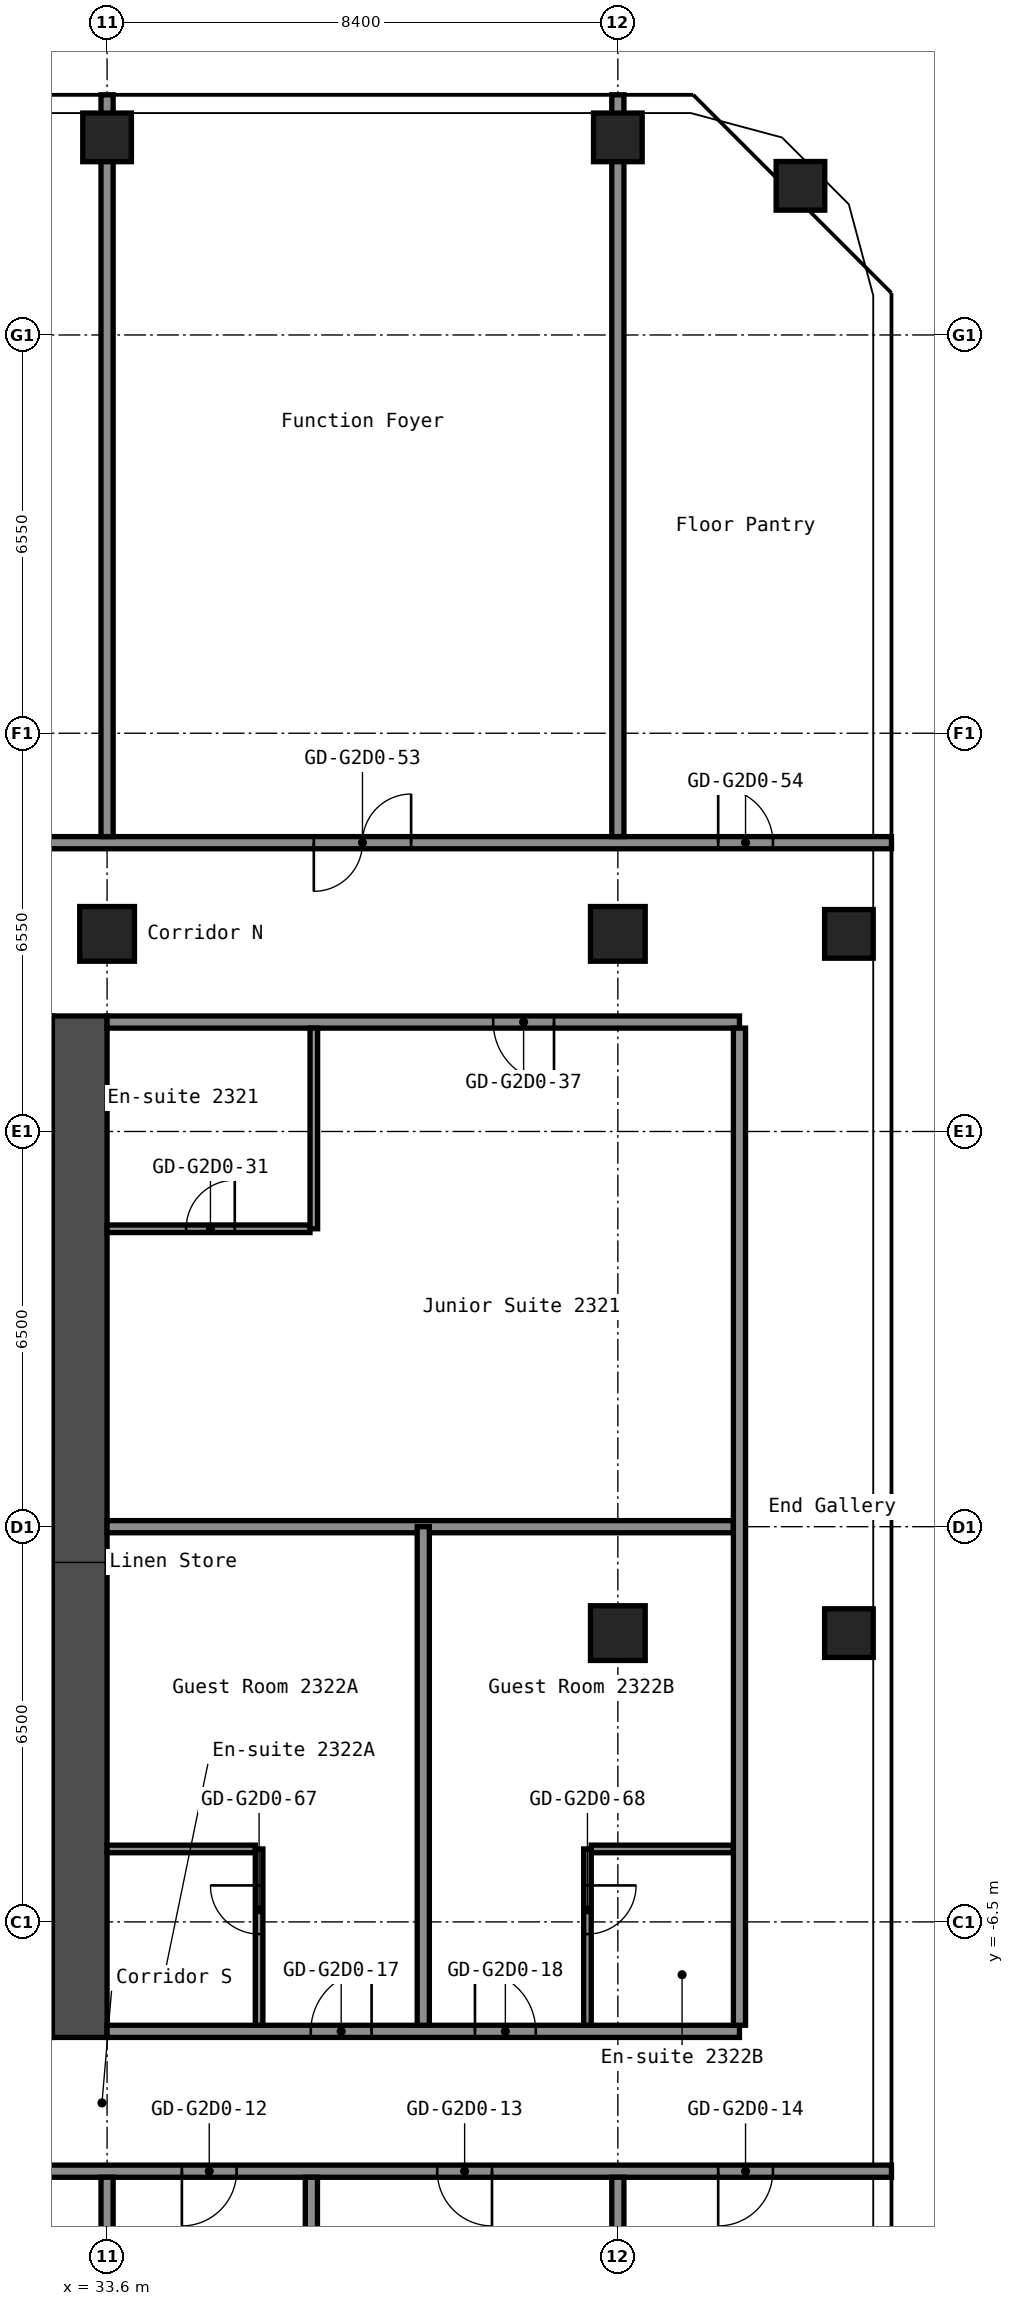
"""IFC4 building model, lengths in metres.
Left out: names, types, materials, properties, quantities, classifications, styles, units other than length and angle.
Written with IfcOpenShell. Run it as: python <this file> out.ifc"""

import sys

from ifc_helpers import new_model, si_unit, direction, frame, frame_2d, origin, origin_2d, place, context, subcontext, project, spatial, rectangle, hollow_rectangle, extrude, element, fill, save


model = new_model("IFC4")
c1 = context("Model", 3, precision=1e-05, world=origin(), true_north=direction((0.0, 1.0)))
c2 = subcontext(c1, "Body", "Model", "MODEL_VIEW")
j1 = project(units=[si_unit("LENGTHUNIT", "METRE"), si_unit("PLANEANGLEUNIT", "RADIAN")], contexts=[c1])
p1 = place(None, origin())
s1 = spatial("IfcSite", under=j1, at=p1, CompositionType="ELEMENT")
p2 = place(p1, origin())
s2 = spatial("IfcBuilding", under=s1, at=p2, CompositionType="ELEMENT")
p3 = place(p2, frame((0.0, 0.0, 85.0)))
s3 = spatial("IfcBuildingStorey", under=s2, at=p3, CompositionType="ELEMENT", Elevation=85.0)
p4 = place(p3, frame((33.6, 9.75, 0.0), z_axis=(0.0, 0.0, 1.0), x_axis=(1.0, 0.0, 0.0)))
e1 = element("IfcColumn", 1, at=p4, inside=s3, PredefinedType="COLUMN", context=c2, shape_type="SweptSolid", body=[
    extrude(hollow_rectangle(XDim=0.9, YDim=0.9, WallThickness=0.036, at=origin_2d()), origin(), (0.0, 0.0, 1.0), 2.8),
])
p5 = place(p3, frame((33.6, 22.85, 0.0), z_axis=(0.0, 0.0, 1.0), x_axis=(1.0, 0.0, 0.0)))
e2 = element("IfcColumn", 2, at=p5, inside=s3, PredefinedType="COLUMN", context=c2, shape_type="SweptSolid", body=[
    extrude(hollow_rectangle(XDim=0.8, YDim=0.8, WallThickness=0.032, at=origin_2d()), origin(), (0.0, 0.0, 1.0), 2.8),
])
for number, where, z_axis, x_axis in (
    (3, (42.0, -1.75, 0.0), (0.0, 0.0, 1.0), (1.0, 0.0, 0.0)),
    (4, (42.0, 9.75, 0.0), (0.0, 0.0, 1.0), (1.0, 0.0, 0.0)),
):
    element("IfcColumn", number, at=place(p3, frame(where, z_axis=z_axis, x_axis=x_axis)), inside=s3, PredefinedType="COLUMN", context=c2, shape_type="SweptSolid", body=[
        extrude(hollow_rectangle(XDim=0.9, YDim=0.9, WallThickness=0.036, at=origin_2d()), origin(), (0.0, 0.0, 1.0), 2.8),
    ])
for number, where, z_axis, x_axis in (
    (5, (42.0, 22.85, 0.0), (0.0, 0.0, 1.0), (1.0, 0.0, 0.0)),
    (6, (45.8, -1.75, 0.0), (0.0, 0.0, 1.0), (1.0, 0.0, 0.0)),
    (7, (45.8, 9.75, 0.0), (0.0, 0.0, 1.0), (1.0, 0.0, 0.0)),
    (8, (45.003, 22.053, 0.0), (0.0, 0.0, 1.0), (1.0, 0.0, 0.0)),
):
    element("IfcColumn", number, at=place(p3, frame(where, z_axis=z_axis, x_axis=x_axis)), inside=s3, PredefinedType="COLUMN", context=c2, shape_type="SweptSolid", body=[
        extrude(hollow_rectangle(XDim=0.8, YDim=0.8, WallThickness=0.032, at=origin_2d()), origin(), (0.0, 0.0, 1.0), 2.8),
    ])
p6 = place(p3, frame((33.15, -8.4, 0.0), z_axis=(0.0, 0.0, 1.0), x_axis=(0.0, 1.0, 0.0)))
e9 = element("IfcWall", 9, at=p6, inside=s3, PredefinedType="SHEAR", context=c2, shape_type="SweptSolid", body=[
    extrude(rectangle(XDim=16.8, YDim=0.9, at=frame_2d((8.4, 0.0))), origin(), (0.0, 0.0, 1.0), 2.8),
])
p7 = place(p3, frame((16.8, -10.6, 0.0), z_axis=(0.0, 0.0, 1.0), x_axis=(1.0, 0.0, 0.0)))
e10 = element("IfcWall", 10, at=p7, inside=s3, PredefinedType="PARTITIONING", context=c2, shape_type="SweptSolid", body=[
    extrude(rectangle(XDim=29.7, YDim=0.2, at=frame_2d((14.85, 0.0))), origin(), (0.0, 0.0, 1.0), 2.8),
])
p8 = place(p7, frame((1.82, 0.0, 0.0)))
e11 = element("IfcOpeningElement", 11, at=p8, cuts=e10, PredefinedType="OPENING", context=c2, shape_type="SweptSolid", body=[
    extrude(rectangle(XDim=0.9, YDim=2.1, at=frame_2d((0.45, 1.05))), frame((0.0, 0.11, 0.0), z_axis=(0.0, -1.0, 0.0), x_axis=(1.0, 0.0, 0.0)), (0.0, 0.0, 1.0), 0.22),
])
p9 = place(p7, frame((6.02, 0.0, 0.0)))
e12 = element("IfcOpeningElement", 12, at=p9, cuts=e10, PredefinedType="OPENING", context=c2, shape_type="SweptSolid", body=[
    extrude(rectangle(XDim=0.9, YDim=2.1, at=frame_2d((0.45, 1.05))), frame((0.0, 0.11, 0.0), z_axis=(0.0, -1.0, 0.0), x_axis=(1.0, 0.0, 0.0)), (0.0, 0.0, 1.0), 0.22),
])
p10 = place(p7, frame((10.3, 0.0, 0.0)))
e13 = element("IfcOpeningElement", 13, at=p10, cuts=e10, PredefinedType="OPENING", context=c2, shape_type="SweptSolid", body=[
    extrude(rectangle(XDim=0.9, YDim=2.1, at=frame_2d((0.45, 1.05))), frame((0.0, 0.11, 0.0), z_axis=(0.0, -1.0, 0.0), x_axis=(1.0, 0.0, 0.0)), (0.0, 0.0, 1.0), 0.22),
])
p11 = place(p7, frame((14.5, 0.0, 0.0)))
e14 = element("IfcOpeningElement", 14, at=p11, cuts=e10, PredefinedType="OPENING", context=c2, shape_type="SweptSolid", body=[
    extrude(rectangle(XDim=0.9, YDim=2.1, at=frame_2d((0.45, 1.05))), frame((0.0, 0.11, 0.0), z_axis=(0.0, -1.0, 0.0), x_axis=(1.0, 0.0, 0.0)), (0.0, 0.0, 1.0), 0.22),
])
p12 = place(p7, frame((18.03, 0.0, 0.0)))
e15 = element("IfcOpeningElement", 15, at=p12, cuts=e10, PredefinedType="OPENING", context=c2, shape_type="SweptSolid", body=[
    extrude(rectangle(XDim=0.9, YDim=2.1, at=frame_2d((0.45, 1.05))), frame((0.0, 0.11, 0.0), z_axis=(0.0, -1.0, 0.0), x_axis=(1.0, 0.0, 0.0)), (0.0, 0.0, 1.0), 0.22),
])
p13 = place(p7, frame((22.23, 0.0, 0.0)))
e16 = element("IfcOpeningElement", 16, at=p13, cuts=e10, PredefinedType="OPENING", context=c2, shape_type="SweptSolid", body=[
    extrude(rectangle(XDim=0.9, YDim=2.1, at=frame_2d((0.45, 1.05))), frame((0.0, 0.11, 0.0), z_axis=(0.0, -1.0, 0.0), x_axis=(1.0, 0.0, 0.0)), (0.0, 0.0, 1.0), 0.22),
])
p14 = place(p7, frame((26.85, 0.0, 0.0)))
e17 = element("IfcOpeningElement", 17, at=p14, cuts=e10, PredefinedType="OPENING", context=c2, shape_type="SweptSolid", body=[
    extrude(rectangle(XDim=0.9, YDim=2.1, at=frame_2d((0.45, 1.05))), frame((0.0, 0.11, 0.0), z_axis=(0.0, -1.0, 0.0), x_axis=(1.0, 0.0, 0.0)), (0.0, 0.0, 1.0), 0.22),
])
p15 = place(p3, frame((33.6, -8.3, 0.0), z_axis=(0.0, 0.0, 1.0), x_axis=(1.0, 0.0, 0.0)))
e18 = element("IfcWall", 18, at=p15, inside=s3, PredefinedType="PARTITIONING", context=c2, shape_type="SweptSolid", body=[
    extrude(rectangle(XDim=10.4, YDim=0.2, at=frame_2d((5.2, 0.0))), origin(), (0.0, 0.0, 1.0), 2.8),
])
p16 = place(p15, frame((3.35, 0.0, 0.0)))
e19 = element("IfcOpeningElement", 19, at=p16, cuts=e18, PredefinedType="OPENING", context=c2, shape_type="SweptSolid", body=[
    extrude(rectangle(XDim=1.0, YDim=2.1, at=frame_2d((0.5, 1.05))), frame((0.0, 0.11, 0.0), z_axis=(0.0, -1.0, 0.0), x_axis=(1.0, 0.0, 0.0)), (0.0, 0.0, 1.0), 0.22),
])
p17 = place(p15, frame((6.05, 0.0, 0.0)))
e20 = element("IfcOpeningElement", 20, at=p17, cuts=e18, PredefinedType="OPENING", context=c2, shape_type="SweptSolid", body=[
    extrude(rectangle(XDim=1.0, YDim=2.1, at=frame_2d((0.5, 1.05))), frame((0.0, 0.11, 0.0), z_axis=(0.0, -1.0, 0.0), x_axis=(1.0, 0.0, 0.0)), (0.0, 0.0, 1.0), 0.22),
])
p18 = place(p3, frame((33.6, -5.3, 0.0), z_axis=(0.0, 0.0, 1.0), x_axis=(1.0, 0.0, 0.0)))
e21 = element("IfcWall", 21, at=p18, inside=s3, PredefinedType="PARTITIONING", context=c2, shape_type="SweptSolid", body=[
    extrude(rectangle(XDim=2.438, YDim=0.125, at=frame_2d((1.219, 0.0))), origin(), (0.0, 0.0, 1.0), 2.8),
])
p19 = place(p3, frame((41.562, -5.3, 0.0), z_axis=(0.0, 0.0, 1.0), x_axis=(1.0, 0.0, 0.0)))
e22 = element("IfcWall", 22, at=p19, inside=s3, PredefinedType="PARTITIONING", context=c2, shape_type="SweptSolid", body=[
    extrude(rectangle(XDim=2.337, YDim=0.125, at=frame_2d((1.169, 0.0))), origin(), (0.0, 0.0, 1.0), 2.8),
])
p20 = place(p3, frame((33.6, 0.0, 0.0), z_axis=(0.0, 0.0, 1.0), x_axis=(1.0, 0.0, 0.0)))
e23 = element("IfcWall", 23, at=p20, inside=s3, PredefinedType="PARTITIONING", context=c2, shape_type="SweptSolid", body=[
    extrude(rectangle(XDim=10.3, YDim=0.2, at=frame_2d((5.15, 0.0))), origin(), (0.0, 0.0, 1.0), 2.8),
])
p21 = place(p3, frame((33.6, 4.9, 0.0), z_axis=(0.0, 0.0, 1.0), x_axis=(1.0, 0.0, 0.0)))
e24 = element("IfcWall", 24, at=p21, inside=s3, PredefinedType="PARTITIONING", context=c2, shape_type="SweptSolid", body=[
    extrude(rectangle(XDim=3.337, YDim=0.125, at=frame_2d((1.669, 0.0))), origin(), (0.0, 0.0, 1.0), 2.8),
])
p22 = place(p21, frame((1.3, 0.0, 0.0)))
e25 = element("IfcOpeningElement", 25, at=p22, cuts=e24, PredefinedType="OPENING", context=c2, shape_type="SweptSolid", body=[
    extrude(rectangle(XDim=0.8, YDim=2.1, at=frame_2d((0.4, 1.05))), frame((0.0, 0.073, 0.0), z_axis=(0.0, -1.0, 0.0), x_axis=(1.0, 0.0, 0.0)), (0.0, 0.0, 1.0), 0.145),
])
p23 = place(p3, frame((33.6, 8.3, 0.0), z_axis=(0.0, 0.0, 1.0), x_axis=(1.0, 0.0, 0.0)))
e26 = element("IfcWall", 26, at=p23, inside=s3, PredefinedType="PARTITIONING", context=c2, shape_type="SweptSolid", body=[
    extrude(rectangle(XDim=10.4, YDim=0.2, at=frame_2d((5.2, 0.0))), origin(), (0.0, 0.0, 1.0), 2.8),
])
p24 = place(p23, frame((6.35, 0.0, 0.0)))
e27 = element("IfcOpeningElement", 27, at=p24, cuts=e26, PredefinedType="OPENING", context=c2, shape_type="SweptSolid", body=[
    extrude(rectangle(XDim=1.0, YDim=2.1, at=frame_2d((0.5, 1.05))), frame((0.0, 0.11, 0.0), z_axis=(0.0, -1.0, 0.0), x_axis=(1.0, 0.0, 0.0)), (0.0, 0.0, 1.0), 0.22),
])
p25 = place(p3, frame((16.8, 11.25, 0.0), z_axis=(0.0, 0.0, 1.0), x_axis=(1.0, 0.0, 0.0)))
e28 = element("IfcWall", 28, at=p25, inside=s3, PredefinedType="PARTITIONING", context=c2, shape_type="SweptSolid", body=[
    extrude(rectangle(XDim=29.7, YDim=0.2, at=frame_2d((14.85, 0.0))), origin(), (0.0, 0.0, 1.0), 2.8),
])
p26 = place(p25, frame((3.4, 0.0, 0.0)))
e29 = element("IfcOpeningElement", 29, at=p26, cuts=e28, PredefinedType="OPENING", context=c2, shape_type="SweptSolid", body=[
    extrude(rectangle(XDim=1.6, YDim=2.1, at=frame_2d((0.8, 1.05))), frame((0.0, 0.11, 0.0), z_axis=(0.0, -1.0, 0.0), x_axis=(1.0, 0.0, 0.0)), (0.0, 0.0, 1.0), 0.22),
])
p27 = place(p25, frame((11.8, 0.0, 0.0)))
e30 = element("IfcOpeningElement", 30, at=p27, cuts=e28, PredefinedType="OPENING", context=c2, shape_type="SweptSolid", body=[
    extrude(rectangle(XDim=1.6, YDim=2.1, at=frame_2d((0.8, 1.05))), frame((0.0, 0.11, 0.0), z_axis=(0.0, -1.0, 0.0), x_axis=(1.0, 0.0, 0.0)), (0.0, 0.0, 1.0), 0.22),
])
p28 = place(p25, frame((20.2, 0.0, 0.0)))
e31 = element("IfcOpeningElement", 31, at=p28, cuts=e28, PredefinedType="OPENING", context=c2, shape_type="SweptSolid", body=[
    extrude(rectangle(XDim=1.6, YDim=2.1, at=frame_2d((0.8, 1.05))), frame((0.0, 0.11, 0.0), z_axis=(0.0, -1.0, 0.0), x_axis=(1.0, 0.0, 0.0)), (0.0, 0.0, 1.0), 0.22),
])
p29 = place(p25, frame((26.85, 0.0, 0.0)))
e32 = element("IfcOpeningElement", 32, at=p29, cuts=e28, PredefinedType="OPENING", context=c2, shape_type="SweptSolid", body=[
    extrude(rectangle(XDim=0.9, YDim=2.1, at=frame_2d((0.45, 1.05))), frame((0.0, 0.11, 0.0), z_axis=(0.0, -1.0, 0.0), x_axis=(1.0, 0.0, 0.0)), (0.0, 0.0, 1.0), 0.22),
])
p30 = place(p3, frame((33.6, -15.55, 0.0), z_axis=(0.0, 0.0, 1.0), x_axis=(0.0, 1.0, 0.0)))
e33 = element("IfcWall", 33, at=p30, inside=s3, PredefinedType="PARTITIONING", context=c2, shape_type="SweptSolid", body=[
    extrude(rectangle(XDim=4.85, YDim=0.2, at=frame_2d((2.425, 0.0))), origin(), (0.0, 0.0, 1.0), 2.8),
])
p31 = place(p3, frame((33.6, 11.35, 0.0), z_axis=(0.0, 0.0, 1.0), x_axis=(0.0, 1.0, 0.0)))
e34 = element("IfcWall", 34, at=p31, inside=s3, PredefinedType="PARTITIONING", context=c2, shape_type="SweptSolid", body=[
    extrude(rectangle(XDim=12.2, YDim=0.2, at=frame_2d((6.1, 0.0))), origin(), (0.0, 0.0, 1.0), 2.8),
])
p32 = place(p3, frame((36.1, -8.2, 0.0), z_axis=(0.0, 0.0, 1.0), x_axis=(0.0, 1.0, 0.0)))
e35 = element("IfcWall", 35, at=p32, inside=s3, PredefinedType="PARTITIONING", context=c2, shape_type="SweptSolid", body=[
    extrude(rectangle(XDim=2.9, YDim=0.125, at=frame_2d((1.45, 0.0))), origin(), (0.0, 0.0, 1.0), 2.8),
])
p33 = place(p32, frame((1.5, 0.0, 0.0)))
e36 = element("IfcOpeningElement", 36, at=p33, cuts=e35, PredefinedType="OPENING", context=c2, shape_type="SweptSolid", body=[
    extrude(rectangle(XDim=0.8, YDim=2.1, at=frame_2d((0.4, 1.05))), frame((0.0, 0.073, 0.0), z_axis=(0.0, -1.0, 0.0), x_axis=(1.0, 0.0, 0.0)), (0.0, 0.0, 1.0), 0.145),
])
p34 = place(p3, frame((36.96, -15.55, 0.0), z_axis=(0.0, 0.0, 1.0), x_axis=(0.0, 1.0, 0.0)))
e37 = element("IfcWall", 37, at=p34, inside=s3, PredefinedType="PARTITIONING", context=c2, shape_type="SweptSolid", body=[
    extrude(rectangle(XDim=4.85, YDim=0.2, at=frame_2d((2.425, 0.0))), origin(), (0.0, 0.0, 1.0), 2.8),
])
p35 = place(p3, frame((37.0, 4.9, 0.0), z_axis=(0.0, 0.0, 1.0), x_axis=(0.0, 1.0, 0.0)))
e38 = element("IfcWall", 38, at=p35, inside=s3, PredefinedType="PARTITIONING", context=c2, shape_type="SweptSolid", body=[
    extrude(rectangle(XDim=3.3, YDim=0.125, at=frame_2d((1.65, 0.0))), origin(), (0.0, 0.0, 1.0), 2.8),
])
p36 = place(p3, frame((38.8, -8.2, 0.0), z_axis=(0.0, 0.0, 1.0), x_axis=(0.0, 1.0, 0.0)))
e39 = element("IfcWall", 39, at=p36, inside=s3, PredefinedType="PARTITIONING", context=c2, shape_type="SweptSolid", body=[
    extrude(rectangle(XDim=8.2, YDim=0.2, at=frame_2d((4.1, 0.0))), origin(), (0.0, 0.0, 1.0), 2.8),
])
p37 = place(p3, frame((41.5, -8.2, 0.0), z_axis=(0.0, 0.0, 1.0), x_axis=(0.0, 1.0, 0.0)))
e40 = element("IfcWall", 40, at=p37, inside=s3, PredefinedType="PARTITIONING", context=c2, shape_type="SweptSolid", body=[
    extrude(rectangle(XDim=2.9, YDim=0.125, at=frame_2d((1.45, 0.0))), origin(), (0.0, 0.0, 1.0), 2.8),
])
p38 = place(p37, frame((1.5, 0.0, 0.0)))
e41 = element("IfcOpeningElement", 41, at=p38, cuts=e40, PredefinedType="OPENING", context=c2, shape_type="SweptSolid", body=[
    extrude(rectangle(XDim=0.8, YDim=2.1, at=frame_2d((0.4, 1.05))), frame((0.0, 0.073, 0.0), z_axis=(0.0, -1.0, 0.0), x_axis=(1.0, 0.0, 0.0)), (0.0, 0.0, 1.0), 0.145),
])
p39 = place(p3, frame((42.0, -15.55, 0.0), z_axis=(0.0, 0.0, 1.0), x_axis=(0.0, 1.0, 0.0)))
e42 = element("IfcWall", 42, at=p39, inside=s3, PredefinedType="PARTITIONING", context=c2, shape_type="SweptSolid", body=[
    extrude(rectangle(XDim=4.85, YDim=0.2, at=frame_2d((2.425, 0.0))), origin(), (0.0, 0.0, 1.0), 2.8),
])
p40 = place(p3, frame((42.0, 11.35, 0.0), z_axis=(0.0, 0.0, 1.0), x_axis=(0.0, 1.0, 0.0)))
e43 = element("IfcWall", 43, at=p40, inside=s3, PredefinedType="PARTITIONING", context=c2, shape_type="SweptSolid", body=[
    extrude(rectangle(XDim=12.2, YDim=0.2, at=frame_2d((6.1, 0.0))), origin(), (0.0, 0.0, 1.0), 2.8),
])
p41 = place(p3, frame((44.0, -8.2, 0.0), z_axis=(0.0, 0.0, 1.0), x_axis=(0.0, 1.0, 0.0)))
e44 = element("IfcWall", 44, at=p41, inside=s3, PredefinedType="PARTITIONING", context=c2, shape_type="SweptSolid", body=[
    extrude(rectangle(XDim=16.4, YDim=0.2, at=frame_2d((8.2, 0.0))), origin(), (0.0, 0.0, 1.0), 2.8),
])
p42 = place(p12, origin())
e45 = element("IfcDoor", 45, at=p42, inside=s3, OperationType="SINGLE_SWING_LEFT", PredefinedType="DOOR", context=c2, shape_type="SweptSolid", body=[
    extrude(rectangle(XDim=0.9, YDim=2.1, at=frame_2d((0.45, 1.05))), frame((0.0, 0.025, 0.0), z_axis=(0.0, -1.0, 0.0), x_axis=(1.0, 0.0, 0.0)), (0.0, 0.0, 1.0), 0.05),
])
fill(e15, e45)
p43 = place(p13, origin())
e46 = element("IfcDoor", 46, at=p43, inside=s3, OperationType="SINGLE_SWING_RIGHT", PredefinedType="DOOR", context=c2, shape_type="SweptSolid", body=[
    extrude(rectangle(XDim=0.9, YDim=2.1, at=frame_2d((0.45, 1.05))), frame((0.0, 0.025, 0.0), z_axis=(0.0, -1.0, 0.0), x_axis=(1.0, 0.0, 0.0)), (0.0, 0.0, 1.0), 0.05),
])
fill(e16, e46)
p44 = place(p14, origin())
e47 = element("IfcDoor", 47, at=p44, inside=s3, OperationType="SINGLE_SWING_LEFT", PredefinedType="DOOR", context=c2, shape_type="SweptSolid", body=[
    extrude(rectangle(XDim=0.9, YDim=2.1, at=frame_2d((0.45, 1.05))), frame((0.0, 0.025, 0.0), z_axis=(0.0, -1.0, 0.0), x_axis=(1.0, 0.0, 0.0)), (0.0, 0.0, 1.0), 0.05),
])
fill(e17, e47)
p45 = place(p16, origin())
e48 = element("IfcDoor", 48, at=p45, inside=s3, OperationType="SINGLE_SWING_LEFT", PredefinedType="DOOR", context=c2, shape_type="SweptSolid", body=[
    extrude(rectangle(XDim=1.0, YDim=2.1, at=frame_2d((0.5, 1.05))), frame((0.0, 0.025, 0.0), z_axis=(0.0, -1.0, 0.0), x_axis=(1.0, 0.0, 0.0)), (0.0, 0.0, 1.0), 0.05),
])
fill(e19, e48)
p46 = place(p17, origin())
e49 = element("IfcDoor", 49, at=p46, inside=s3, OperationType="SINGLE_SWING_RIGHT", PredefinedType="DOOR", context=c2, shape_type="SweptSolid", body=[
    extrude(rectangle(XDim=1.0, YDim=2.1, at=frame_2d((0.5, 1.05))), frame((0.0, 0.025, 0.0), z_axis=(0.0, -1.0, 0.0), x_axis=(1.0, 0.0, 0.0)), (0.0, 0.0, 1.0), 0.05),
])
fill(e20, e49)
p47 = place(p22, origin())
e50 = element("IfcDoor", 50, at=p47, inside=s3, OperationType="SINGLE_SWING_LEFT", PredefinedType="DOOR", context=c2, shape_type="SweptSolid", body=[
    extrude(rectangle(XDim=0.8, YDim=2.1, at=frame_2d((0.4, 1.05))), frame((0.0, 0.025, 0.0), z_axis=(0.0, -1.0, 0.0), x_axis=(1.0, 0.0, 0.0)), (0.0, 0.0, 1.0), 0.05),
])
fill(e25, e50)
p48 = place(p24, origin())
e51 = element("IfcDoor", 51, at=p48, inside=s3, OperationType="SINGLE_SWING_RIGHT", PredefinedType="DOOR", context=c2, shape_type="SweptSolid", body=[
    extrude(rectangle(XDim=1.0, YDim=2.1, at=frame_2d((0.5, 1.05))), frame((0.0, 0.025, 0.0), z_axis=(0.0, -1.0, 0.0), x_axis=(1.0, 0.0, 0.0)), (0.0, 0.0, 1.0), 0.05),
])
fill(e27, e51)
p49 = place(p28, origin())
e52 = element("IfcDoor", 52, at=p49, inside=s3, OperationType="DOUBLE_DOOR_SINGLE_SWING", PredefinedType="DOOR", context=c2, shape_type="SweptSolid", body=[
    extrude(rectangle(XDim=1.6, YDim=2.1, at=frame_2d((0.8, 1.05))), frame((0.0, 0.025, 0.0), z_axis=(0.0, -1.0, 0.0), x_axis=(1.0, 0.0, 0.0)), (0.0, 0.0, 1.0), 0.05),
])
fill(e31, e52)
p50 = place(p29, origin())
e53 = element("IfcDoor", 53, at=p50, inside=s3, OperationType="SINGLE_SWING_RIGHT", PredefinedType="DOOR", context=c2, shape_type="SweptSolid", body=[
    extrude(rectangle(XDim=0.9, YDim=2.1, at=frame_2d((0.45, 1.05))), frame((0.0, 0.025, 0.0), z_axis=(0.0, -1.0, 0.0), x_axis=(1.0, 0.0, 0.0)), (0.0, 0.0, 1.0), 0.05),
])
fill(e32, e53)
p51 = place(p33, origin())
e54 = element("IfcDoor", 54, at=p51, inside=s3, OperationType="SINGLE_SWING_LEFT", PredefinedType="DOOR", context=c2, shape_type="SweptSolid", body=[
    extrude(rectangle(XDim=0.8, YDim=2.1, at=frame_2d((0.4, 1.05))), frame((0.0, 0.025, 0.0), z_axis=(0.0, -1.0, 0.0), x_axis=(1.0, 0.0, 0.0)), (0.0, 0.0, 1.0), 0.05),
])
fill(e36, e54)
p52 = place(p38, origin())
e55 = element("IfcDoor", 55, at=p52, inside=s3, OperationType="SINGLE_SWING_RIGHT", PredefinedType="DOOR", context=c2, shape_type="SweptSolid", body=[
    extrude(rectangle(XDim=0.8, YDim=2.1, at=frame_2d((0.4, 1.05))), frame((0.0, 0.025, 0.0), z_axis=(0.0, -1.0, 0.0), x_axis=(1.0, 0.0, 0.0)), (0.0, 0.0, 1.0), 0.05),
])
fill(e41, e55)
save(model, sys.argv[1])
